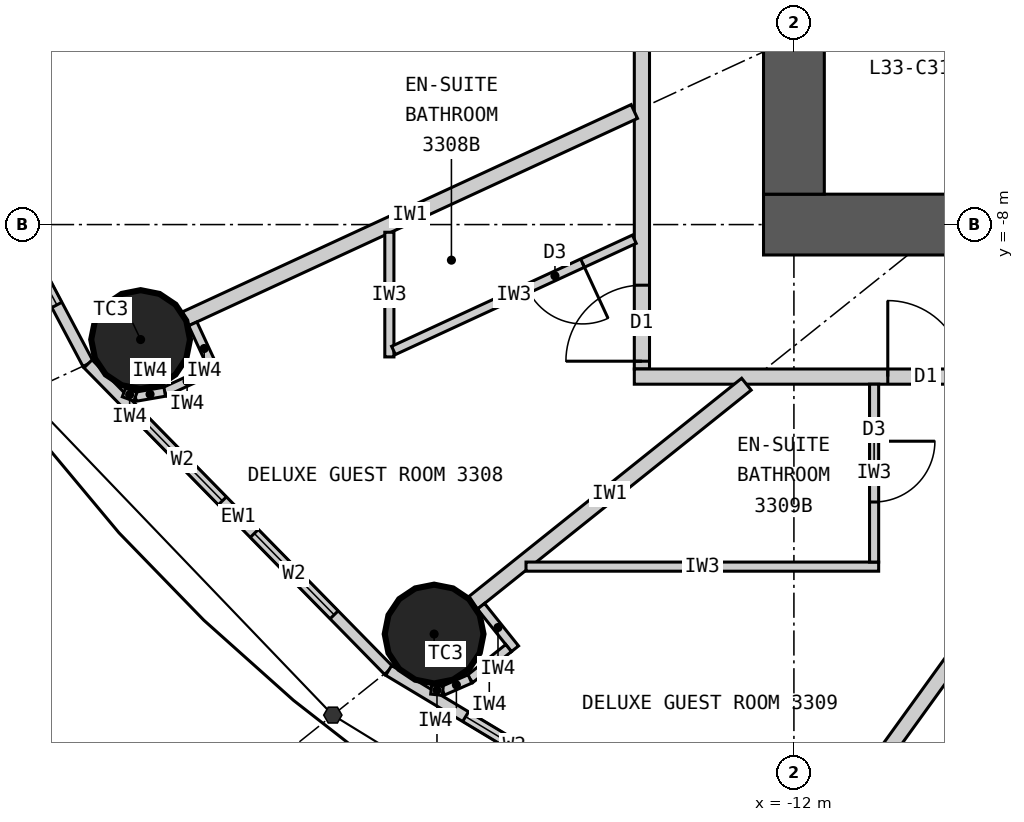
"""IFC4 building model, lengths in metres.
Left out: names, types, materials, properties, quantities, classifications, styles, units other than length and angle.
Written with IfcOpenShell. Run it as: python <this file> out.ifc"""

import sys

from ifc_helpers import new_model, si_unit, direction, frame, frame_2d, origin, origin_2d, place, context, subcontext, project, spatial, rectangle, circle, extrude, element, fill, save


model = new_model("IFC4")
c1 = context("Model", 3, precision=1e-05, world=origin(), true_north=direction((0.0, 1.0)))
c2 = subcontext(c1, "Body", "Model", "MODEL_VIEW")
j1 = project(units=[si_unit("LENGTHUNIT", "METRE"), si_unit("PLANEANGLEUNIT", "RADIAN")], contexts=[c1])
p1 = place(None, origin())
s1 = spatial("IfcSite", under=j1, at=p1, CompositionType="ELEMENT")
p2 = place(p1, origin())
s2 = spatial("IfcBuilding", under=s1, at=p2, CompositionType="ELEMENT")
p3 = place(p2, frame((0.0, 0.0, 128.7)))
s3 = spatial("IfcBuildingStorey", under=s2, at=p3, CompositionType="ELEMENT", Elevation=128.7)
for number, where, z_axis, x_axis in (
    (1, (-20.596, -9.513, 0.0), (0.0, 0.0, 1.0), (1.0, 0.0, 0.0)),
    (2, (-16.734, -13.387, 0.0), (0.0, 0.0, 1.0), (1.0, 0.0, 0.0)),
):
    element("IfcColumn", number, at=place(p3, frame(where, z_axis=z_axis, x_axis=x_axis)), inside=s3, PredefinedType="COLUMN", context=c2, shape_type="SweptSolid", body=[
        extrude(circle(Radius=0.65, at=origin_2d()), origin(), (0.0, 0.0, 1.0), 3.3),
    ])
p4 = place(p3, frame((12.4, -8.0, 0.0), z_axis=(0.0, 0.0, 1.0), x_axis=(-1.0, 0.0, 0.0)))
e3 = element("IfcWall", 3, at=p4, inside=s3, PredefinedType="SHEAR", context=c2, shape_type="SweptSolid", body=[
    extrude(rectangle(XDim=24.8, YDim=0.8, at=frame_2d((12.4, 0.0))), origin(), (0.0, 0.0, 1.0), 3.3),
])
p5 = place(p4, frame((11.1, 0.0, 0.0)))
e4 = element("IfcOpeningElement", 4, at=p5, cuts=e3, PredefinedType="OPENING", context=c2, shape_type="SweptSolid", body=[
    extrude(rectangle(XDim=1.2, YDim=2.2, at=frame_2d((0.6, 1.1))), frame((0.0, 0.41, 0.0), z_axis=(0.0, -1.0, 0.0), x_axis=(1.0, 0.0, 0.0)), (0.0, 0.0, 1.0), 0.82),
])
p6 = place(p4, frame((18.7, 0.0, 0.0)))
e5 = element("IfcOpeningElement", 5, at=p6, cuts=e3, PredefinedType="OPENING", context=c2, shape_type="SweptSolid", body=[
    extrude(rectangle(XDim=0.9, YDim=2.2, at=frame_2d((0.45, 1.1))), frame((0.0, 0.41, 0.0), z_axis=(0.0, -1.0, 0.0), x_axis=(1.0, 0.0, 0.0)), (0.0, 0.0, 1.0), 0.82),
])
p7 = place(p3, frame((-12.0, 7.6, 0.0), z_axis=(0.0, 0.0, 1.0), x_axis=(0.0, -1.0, 0.0)))
e6 = element("IfcWall", 6, at=p7, inside=s3, PredefinedType="SHEAR", context=c2, shape_type="SweptSolid", body=[
    extrude(rectangle(XDim=15.2, YDim=0.8, at=frame_2d((7.6, 0.0))), origin(), (0.0, 0.0, 1.0), 3.3),
])
p8 = place(p7, frame((6.7, 0.0, 0.0)))
e7 = element("IfcOpeningElement", 7, at=p8, cuts=e6, PredefinedType="OPENING", context=c2, shape_type="SweptSolid", body=[
    extrude(rectangle(XDim=1.8, YDim=2.2, at=frame_2d((0.9, 1.1))), frame((0.0, 0.41, 0.0), z_axis=(0.0, -1.0, 0.0), x_axis=(1.0, 0.0, 0.0)), (0.0, 0.0, 1.0), 0.82),
])
p9 = place(p3, frame((-23.792, -5.1, 0.0), z_axis=(0.0, 0.0, 1.0), x_axis=(0.467814388454, -0.883826735257, 0.0)))
e8 = element("IfcWall", 8, at=p9, inside=s3, PredefinedType="ELEMENTEDWALL", context=c2, shape_type="SweptSolid", body=[
    extrude(rectangle(XDim=5.354, YDim=0.15, at=frame_2d((2.677, 0.0))), origin(), (0.0, 0.0, 1.0), 3.12),
])
p10 = place(p9, frame((0.877, 0.0, 0.9)))
e9 = element("IfcOpeningElement", 9, at=p10, cuts=e8, PredefinedType="OPENING", context=c2, shape_type="SweptSolid", body=[
    extrude(rectangle(XDim=1.5, YDim=1.9, at=frame_2d((0.75, 0.95))), frame((0.0, 0.085, 0.0), z_axis=(0.0, -1.0, 0.0), x_axis=(1.0, 0.0, 0.0)), (0.0, 0.0, 1.0), 0.17),
])
p11 = place(p9, frame((2.977, 0.0, 0.9)))
e10 = element("IfcOpeningElement", 10, at=p11, cuts=e8, PredefinedType="OPENING", context=c2, shape_type="SweptSolid", body=[
    extrude(rectangle(XDim=1.5, YDim=1.9, at=frame_2d((0.75, 0.95))), frame((0.0, 0.085, 0.0), z_axis=(0.0, -1.0, 0.0), x_axis=(1.0, 0.0, 0.0)), (0.0, 0.0, 1.0), 0.17),
])
p12 = place(p3, frame((-21.287, -9.832, 0.0), z_axis=(0.0, 0.0, 1.0), x_axis=(0.700136650834, -0.714008872605, 0.0)))
e11 = element("IfcWall", 11, at=p12, inside=s3, PredefinedType="ELEMENTEDWALL", context=c2, shape_type="SweptSolid", body=[
    extrude(rectangle(XDim=5.649, YDim=0.15, at=frame_2d((2.825, 0.0))), origin(), (0.0, 0.0, 1.0), 3.12),
])
p13 = place(p12, frame((1.025, 0.0, 0.9)))
e12 = element("IfcOpeningElement", 12, at=p13, cuts=e11, PredefinedType="OPENING", context=c2, shape_type="SweptSolid", body=[
    extrude(rectangle(XDim=1.5, YDim=1.9, at=frame_2d((0.75, 0.95))), frame((0.0, 0.085, 0.0), z_axis=(0.0, -1.0, 0.0), x_axis=(1.0, 0.0, 0.0)), (0.0, 0.0, 1.0), 0.17),
])
p14 = place(p12, frame((3.125, 0.0, 0.9)))
e13 = element("IfcOpeningElement", 13, at=p14, cuts=e11, PredefinedType="OPENING", context=c2, shape_type="SweptSolid", body=[
    extrude(rectangle(XDim=1.5, YDim=1.9, at=frame_2d((0.75, 0.95))), frame((0.0, 0.085, 0.0), z_axis=(0.0, -1.0, 0.0), x_axis=(1.0, 0.0, 0.0)), (0.0, 0.0, 1.0), 0.17),
])
p15 = place(p3, frame((-17.332, -13.866, 0.0), z_axis=(0.0, 0.0, 1.0), x_axis=(0.857308573723, -0.514802884044, 0.0)))
e14 = element("IfcWall", 14, at=p15, inside=s3, PredefinedType="ELEMENTEDWALL", context=c2, shape_type="SweptSolid", body=[
    extrude(rectangle(XDim=5.961, YDim=0.15, at=frame_2d((2.98, 0.0))), origin(), (0.0, 0.0, 1.0), 3.12),
])
p16 = place(p15, frame((1.181, 0.0, 0.9)))
e15 = element("IfcOpeningElement", 15, at=p16, cuts=e14, PredefinedType="OPENING", context=c2, shape_type="SweptSolid", body=[
    extrude(rectangle(XDim=1.5, YDim=1.9, at=frame_2d((0.75, 0.95))), frame((0.0, 0.085, 0.0), z_axis=(0.0, -1.0, 0.0), x_axis=(1.0, 0.0, 0.0)), (0.0, 0.0, 1.0), 0.17),
])
p17 = place(p15, frame((3.281, 0.0, 0.9)))
e16 = element("IfcOpeningElement", 16, at=p17, cuts=e14, PredefinedType="OPENING", context=c2, shape_type="SweptSolid", body=[
    extrude(rectangle(XDim=1.5, YDim=1.9, at=frame_2d((0.75, 0.95))), frame((0.0, 0.085, 0.0), z_axis=(0.0, -1.0, 0.0), x_axis=(1.0, 0.0, 0.0)), (0.0, 0.0, 1.0), 0.17),
])
p18 = place(p3, frame((-14.0, 9.9, 0.0), z_axis=(0.0, 0.0, 1.0), x_axis=(0.0, -1.0, 0.0)))
e17 = element("IfcWall", 17, at=p18, inside=s3, PredefinedType="PARTITIONING", context=c2, shape_type="SweptSolid", body=[
    extrude(rectangle(XDim=19.8, YDim=0.2, at=frame_2d((9.9, 0.0))), origin(), (0.0, 0.0, 1.0), 3.12),
])
p19 = place(p18, frame((2.822, 0.0, 0.0)))
e18 = element("IfcOpeningElement", 18, at=p19, cuts=e17, PredefinedType="OPENING", context=c2, shape_type="SweptSolid", body=[
    extrude(rectangle(XDim=1.0, YDim=2.2, at=frame_2d((0.5, 1.1))), frame((0.0, 0.11, 0.0), z_axis=(0.0, -1.0, 0.0), x_axis=(1.0, 0.0, 0.0)), (0.0, 0.0, 1.0), 0.22),
])
p20 = place(p18, frame((13.742, 0.0, 0.0)))
e19 = element("IfcOpeningElement", 19, at=p20, cuts=e17, PredefinedType="OPENING", context=c2, shape_type="SweptSolid", body=[
    extrude(rectangle(XDim=1.0, YDim=2.2, at=frame_2d((0.5, 1.1))), frame((0.0, 0.11, 0.0), z_axis=(0.0, -1.0, 0.0), x_axis=(1.0, 0.0, 0.0)), (0.0, 0.0, 1.0), 0.22),
])
p21 = place(p18, frame((18.698, 0.0, 0.0)))
e20 = element("IfcOpeningElement", 20, at=p21, cuts=e17, PredefinedType="OPENING", context=c2, shape_type="SweptSolid", body=[
    extrude(rectangle(XDim=1.0, YDim=2.2, at=frame_2d((0.5, 1.1))), frame((0.0, 0.11, 0.0), z_axis=(0.0, -1.0, 0.0), x_axis=(1.0, 0.0, 0.0)), (0.0, 0.0, 1.0), 0.22),
])
p22 = place(p3, frame((-3.283, -10.0, 0.0), z_axis=(0.0, 0.0, 1.0), x_axis=(-1.0, 0.0, 0.0)))
e21 = element("IfcWall", 21, at=p22, inside=s3, PredefinedType="PARTITIONING", context=c2, shape_type="SweptSolid", body=[
    extrude(rectangle(XDim=10.817, YDim=0.2, at=frame_2d((5.409, 0.0))), origin(), (0.0, 0.0, 1.0), 3.12),
])
p23 = place(p22, frame((6.482, 0.0, 0.0)))
e22 = element("IfcOpeningElement", 22, at=p23, cuts=e21, PredefinedType="OPENING", context=c2, shape_type="SweptSolid", body=[
    extrude(rectangle(XDim=1.0, YDim=2.2, at=frame_2d((0.5, 1.1))), frame((0.0, 0.11, 0.0), z_axis=(0.0, -1.0, 0.0), x_axis=(1.0, 0.0, 0.0)), (0.0, 0.0, 1.0), 0.22),
])
p24 = place(p3, frame((-14.1, -6.512, 0.0), z_axis=(0.0, 0.0, 1.0), x_axis=(-0.907833019998, -0.419331858797, 0.0)))
e23 = element("IfcWall", 23, at=p24, inside=s3, PredefinedType="PARTITIONING", context=c2, shape_type="SweptSolid", body=[
    extrude(rectangle(XDim=6.505, YDim=0.2, at=frame_2d((3.252, 0.0))), origin(), (0.0, 0.0, 1.0), 2.27),
])
p25 = place(p3, frame((-12.625, -10.1, 0.0), z_axis=(0.0, 0.0, 1.0), x_axis=(-0.780863644897, -0.624701503182, 0.0)))
e24 = element("IfcWall", 24, at=p25, inside=s3, PredefinedType="PARTITIONING", context=c2, shape_type="SweptSolid", body=[
    extrude(rectangle(XDim=4.612, YDim=0.2, at=frame_2d((2.306, 0.0))), origin(), (0.0, 0.0, 1.0), 2.37),
])
p26 = place(p3, frame((-7.289, -10.1, 0.0), z_axis=(0.0, 0.0, 1.0), x_axis=(-0.585217367024, -0.81087645997, 0.0)))
e25 = element("IfcWall", 25, at=p26, inside=s3, PredefinedType="PARTITIONING", context=c2, shape_type="SweptSolid", body=[
    extrude(rectangle(XDim=7.016, YDim=0.2, at=frame_2d((3.508, 0.0))), origin(), (0.0, 0.0, 1.0), 2.37),
])
p27 = place(p3, frame((-17.323, -8.101, 0.0), z_axis=(0.0, 0.0, 1.0), x_axis=(0.0, -1.0, 0.0)))
e26 = element("IfcWall", 26, at=p27, inside=s3, PredefinedType="PARTITIONING", context=c2, shape_type="SweptSolid", body=[
    extrude(rectangle(XDim=1.64, YDim=0.12, at=frame_2d((0.82, 0.0))), origin(), (0.0, 0.0, 1.0), 3.12),
])
p28 = place(p3, frame((-14.1, -8.193, 0.0), z_axis=(0.0, 0.0, 1.0), x_axis=(-0.907836493557, -0.419324338628, 0.0)))
e27 = element("IfcWall", 27, at=p28, inside=s3, PredefinedType="PARTITIONING", context=c2, shape_type="SweptSolid", body=[
    extrude(rectangle(XDim=3.49, YDim=0.12, at=frame_2d((1.745, 0.0))), origin(), (0.0, 0.0, 1.0), 3.12),
])
p29 = place(p28, frame((0.75, 0.0, 0.0)))
e28 = element("IfcOpeningElement", 28, at=p29, cuts=e27, PredefinedType="OPENING", context=c2, shape_type="SweptSolid", body=[
    extrude(rectangle(XDim=0.8, YDim=2.1, at=frame_2d((0.4, 1.05))), frame((0.0, 0.07, 0.0), z_axis=(0.0, -1.0, 0.0), x_axis=(1.0, 0.0, 0.0)), (0.0, 0.0, 1.0), 0.14),
])
p30 = place(p3, frame((-15.525, -12.5, 0.0), z_axis=(0.0, 0.0, 1.0), x_axis=(1.0, 0.0, 0.0)))
e29 = element("IfcWall", 29, at=p30, inside=s3, PredefinedType="PARTITIONING", context=c2, shape_type="SweptSolid", body=[
    extrude(rectangle(XDim=4.64, YDim=0.12, at=frame_2d((2.32, 0.0))), origin(), (0.0, 0.0, 1.0), 3.12),
])
p31 = place(p3, frame((-10.945, -10.1, 0.0), z_axis=(0.0, 0.0, 1.0), x_axis=(0.0, -1.0, 0.0)))
e30 = element("IfcWall", 30, at=p31, inside=s3, PredefinedType="PARTITIONING", context=c2, shape_type="SweptSolid", body=[
    extrude(rectangle(XDim=2.34, YDim=0.12, at=frame_2d((1.17, 0.0))), origin(), (0.0, 0.0, 1.0), 3.12),
])
p32 = place(p31, frame((0.75, 0.0, 0.0)))
e31 = element("IfcOpeningElement", 31, at=p32, cuts=e30, PredefinedType="OPENING", context=c2, shape_type="SweptSolid", body=[
    extrude(rectangle(XDim=0.8, YDim=2.1, at=frame_2d((0.4, 1.05))), frame((0.0, 0.07, 0.0), z_axis=(0.0, -1.0, 0.0), x_axis=(1.0, 0.0, 0.0)), (0.0, 0.0, 1.0), 0.14),
])
p33 = place(p3, frame((-19.909, -9.306, 0.0), z_axis=(0.0, 0.0, 1.0), x_axis=(0.419296148934, -0.90784951368, 0.0)))
e32 = element("IfcWall", 32, at=p33, inside=s3, PredefinedType="PARTITIONING", context=c2, shape_type="SweptSolid", body=[
    extrude(rectangle(XDim=0.716, YDim=0.12, at=frame_2d((0.358, 0.0))), origin(), (0.0, 0.0, 1.0), 3.12),
])
p34 = place(p3, frame((-19.689, -9.926, 0.0), z_axis=(0.0, 0.0, 1.0), x_axis=(-0.907893409272, -0.419201094227, 0.0)))
e33 = element("IfcWall", 33, at=p34, inside=s3, PredefinedType="PARTITIONING", context=c2, shape_type="SweptSolid", body=[
    extrude(rectangle(XDim=0.65, YDim=0.12, at=frame_2d((0.325, 0.0))), origin(), (0.0, 0.0, 1.0), 3.12),
])
p35 = place(p3, frame((-20.279, -10.199, 0.0), z_axis=(0.0, 0.0, 1.0), x_axis=(-0.985380740712, -0.170366651181, 0.0)))
e34 = element("IfcWall", 34, at=p35, inside=s3, PredefinedType="PARTITIONING", context=c2, shape_type="SweptSolid", body=[
    extrude(rectangle(XDim=0.391, YDim=0.12, at=frame_2d((0.196, 0.0))), origin(), (0.0, 0.0, 1.0), 3.12),
])
p36 = place(p3, frame((-20.664, -10.265, 0.0), z_axis=(0.0, 0.0, 1.0), x_axis=(-0.938058651481, 0.346476501918, 0.0)))
e35 = element("IfcWall", 35, at=p36, inside=s3, PredefinedType="PARTITIONING", context=c2, shape_type="SweptSolid", body=[
    extrude(rectangle(XDim=0.161, YDim=0.12, at=frame_2d((0.081, 0.0))), origin(), (0.0, 0.0, 1.0), 3.12),
])
p37 = place(p3, frame((-16.117, -13.022, 0.0), z_axis=(0.0, 0.0, 1.0), x_axis=(0.62465344249, -0.780902091677, 0.0)))
e36 = element("IfcWall", 36, at=p37, inside=s3, PredefinedType="PARTITIONING", context=c2, shape_type="SweptSolid", body=[
    extrude(rectangle(XDim=0.716, YDim=0.12, at=frame_2d((0.358, 0.0))), origin(), (0.0, 0.0, 1.0), 3.12),
])
p38 = place(p3, frame((-15.754, -13.571, 0.0), z_axis=(0.0, 0.0, 1.0), x_axis=(-0.780905453553, -0.624649239663, 0.0)))
e37 = element("IfcWall", 37, at=p38, inside=s3, PredefinedType="PARTITIONING", context=c2, shape_type="SweptSolid", body=[
    extrude(rectangle(XDim=0.65, YDim=0.12, at=frame_2d((0.325, 0.0))), origin(), (0.0, 0.0, 1.0), 3.12),
])
p39 = place(p3, frame((-16.262, -13.977, 0.0), z_axis=(0.0, 0.0, 1.0), x_axis=(-0.915985403703, -0.401211590314, 0.0)))
e38 = element("IfcWall", 38, at=p39, inside=s3, PredefinedType="PARTITIONING", context=c2, shape_type="SweptSolid", body=[
    extrude(rectangle(XDim=0.391, YDim=0.12, at=frame_2d((0.196, 0.0))), origin(), (0.0, 0.0, 1.0), 3.12),
])
p40 = place(p3, frame((-16.62, -14.134, 0.0), z_axis=(0.0, 0.0, 1.0), x_axis=(-0.993941871493, 0.109907033867, 0.0)))
e39 = element("IfcWall", 39, at=p40, inside=s3, PredefinedType="PARTITIONING", context=c2, shape_type="SweptSolid", body=[
    extrude(rectangle(XDim=0.153, YDim=0.12, at=frame_2d((0.077, 0.0))), origin(), (0.0, 0.0, 1.0), 3.12),
])
p41 = place(p11, origin())
e40 = element("IfcWindow", 40, at=p41, inside=s3, PartitioningType="SINGLE_PANEL", PredefinedType="WINDOW", context=c2, shape_type="SweptSolid", body=[
    extrude(rectangle(XDim=1.5, YDim=1.9, at=frame_2d((0.75, 0.95))), frame((0.0, 0.03, 0.0), z_axis=(0.0, -1.0, 0.0), x_axis=(1.0, 0.0, 0.0)), (0.0, 0.0, 1.0), 0.06),
])
fill(e10, e40)
p42 = place(p13, origin())
e41 = element("IfcWindow", 41, at=p42, inside=s3, PartitioningType="SINGLE_PANEL", PredefinedType="WINDOW", context=c2, shape_type="SweptSolid", body=[
    extrude(rectangle(XDim=1.5, YDim=1.9, at=frame_2d((0.75, 0.95))), frame((0.0, 0.03, 0.0), z_axis=(0.0, -1.0, 0.0), x_axis=(1.0, 0.0, 0.0)), (0.0, 0.0, 1.0), 0.06),
])
fill(e12, e41)
p43 = place(p14, origin())
e42 = element("IfcWindow", 42, at=p43, inside=s3, PartitioningType="SINGLE_PANEL", PredefinedType="WINDOW", context=c2, shape_type="SweptSolid", body=[
    extrude(rectangle(XDim=1.5, YDim=1.9, at=frame_2d((0.75, 0.95))), frame((0.0, 0.03, 0.0), z_axis=(0.0, -1.0, 0.0), x_axis=(1.0, 0.0, 0.0)), (0.0, 0.0, 1.0), 0.06),
])
fill(e13, e42)
p44 = place(p16, origin())
e43 = element("IfcWindow", 43, at=p44, inside=s3, PartitioningType="SINGLE_PANEL", PredefinedType="WINDOW", context=c2, shape_type="SweptSolid", body=[
    extrude(rectangle(XDim=1.5, YDim=1.9, at=frame_2d((0.75, 0.95))), frame((0.0, 0.03, 0.0), z_axis=(0.0, -1.0, 0.0), x_axis=(1.0, 0.0, 0.0)), (0.0, 0.0, 1.0), 0.06),
])
fill(e15, e43)
p45 = place(p29, origin())
e44 = element("IfcDoor", 44, at=p45, inside=s3, OperationType="SINGLE_SWING_LEFT", PredefinedType="DOOR", context=c2, shape_type="SweptSolid", body=[
    extrude(rectangle(XDim=0.8, YDim=2.1, at=frame_2d((0.4, 1.05))), frame((0.0, 0.025, 0.0), z_axis=(0.0, -1.0, 0.0), x_axis=(1.0, 0.0, 0.0)), (0.0, 0.0, 1.0), 0.05),
])
fill(e28, e44)
p46 = place(p21, origin())
e45 = element("IfcDoor", 45, at=p46, inside=s3, OperationType="SINGLE_SWING_RIGHT", PredefinedType="DOOR", context=c2, shape_type="SweptSolid", body=[
    extrude(rectangle(XDim=1.0, YDim=2.2, at=frame_2d((0.5, 1.1))), frame((0.0, 0.025, 0.0), z_axis=(0.0, -1.0, 0.0), x_axis=(1.0, 0.0, 0.0)), (0.0, 0.0, 1.0), 0.05),
])
fill(e20, e45)
p47 = place(p32, origin())
e46 = element("IfcDoor", 46, at=p47, inside=s3, OperationType="SINGLE_SWING_LEFT", PredefinedType="DOOR", context=c2, shape_type="SweptSolid", body=[
    extrude(rectangle(XDim=0.8, YDim=2.1, at=frame_2d((0.4, 1.05))), frame((0.0, 0.025, 0.0), z_axis=(0.0, -1.0, 0.0), x_axis=(1.0, 0.0, 0.0)), (0.0, 0.0, 1.0), 0.05),
])
fill(e31, e46)
p48 = place(p23, origin())
e47 = element("IfcDoor", 47, at=p48, inside=s3, OperationType="SINGLE_SWING_RIGHT", PredefinedType="DOOR", context=c2, shape_type="SweptSolid", body=[
    extrude(rectangle(XDim=1.0, YDim=2.2, at=frame_2d((0.5, 1.1))), frame((0.0, 0.025, 0.0), z_axis=(0.0, -1.0, 0.0), x_axis=(1.0, 0.0, 0.0)), (0.0, 0.0, 1.0), 0.05),
])
fill(e22, e47)
save(model, sys.argv[1])
